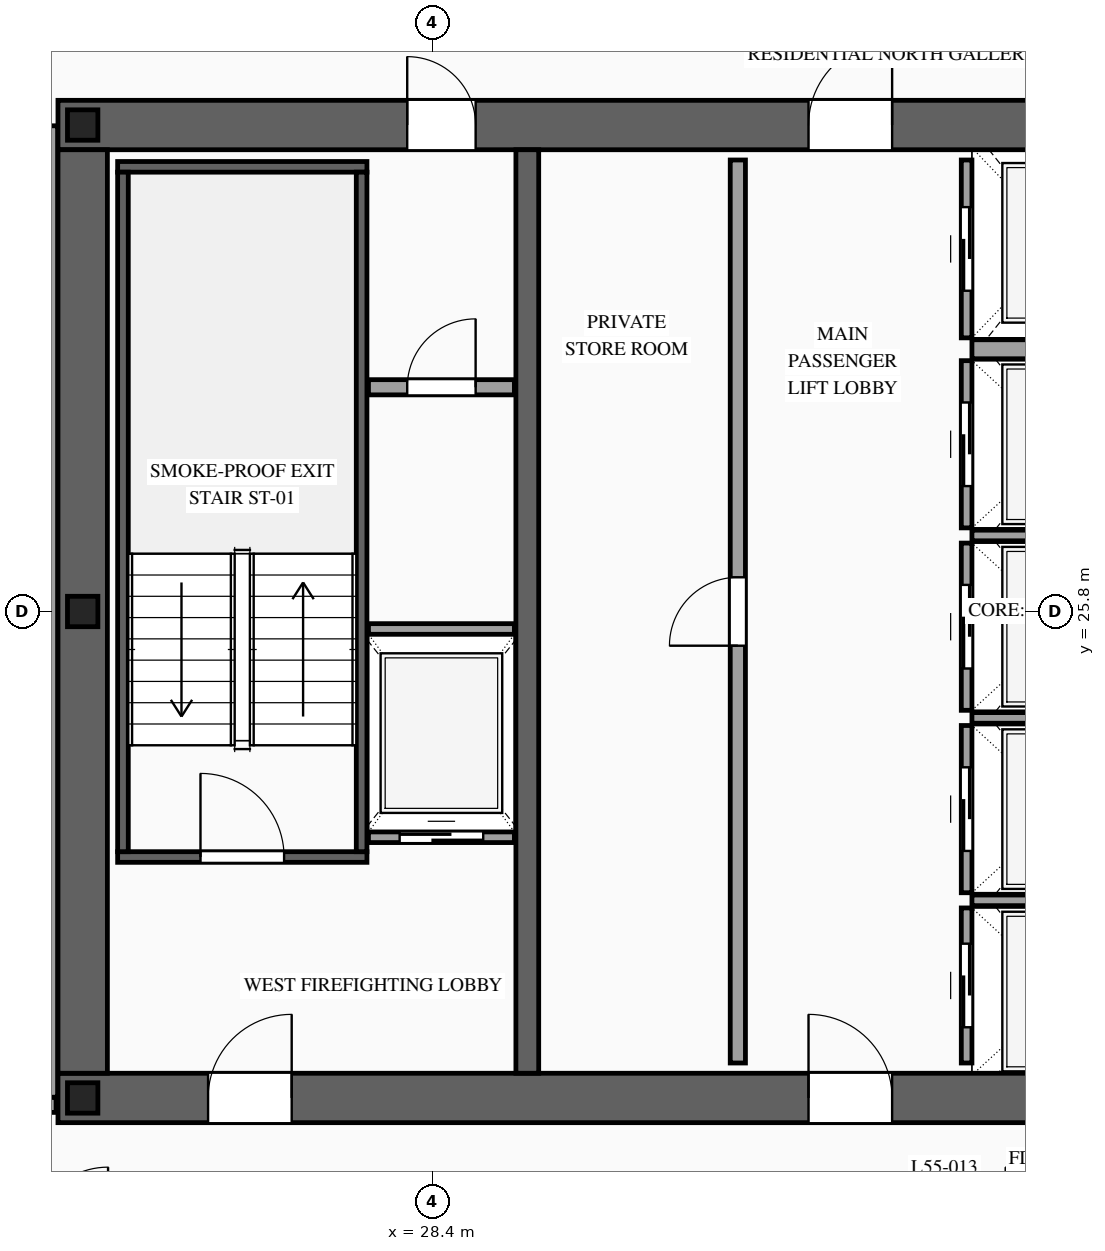
"""IFC4 building model, lengths in metres.
Left out: names, types, materials, properties, quantities, classifications, styles, units other than length and angle.
Written with IfcOpenShell. Run it as: python <this file> out.ifc"""

import sys

from ifc_helpers import new_model, si_unit, direction, frame, frame_2d, origin, origin_2d, place, context, subcontext, project, spatial, rectangle, i_section, extrude, source, transform, mapped, element, fill, save


model = new_model("IFC4")
c1 = context("Model", 3, precision=1e-05, world=origin(), true_north=direction((0.0, 1.0)))
c2 = subcontext(c1, "Body", "Model", "MODEL_VIEW")
j1 = project(units=[si_unit("LENGTHUNIT", "METRE"), si_unit("PLANEANGLEUNIT", "RADIAN")], contexts=[c1])
p1 = place(None, origin())
s1 = spatial("IfcSite", under=j1, at=p1, CompositionType="ELEMENT")
p2 = place(p1, origin())
s2 = spatial("IfcBuilding", under=s1, at=p2, CompositionType="ELEMENT")
p3 = place(p2, frame((0.0, 0.0, 209.0)))
s3 = spatial("IfcBuildingStorey", under=s2, at=p3, CompositionType="ELEMENT", Elevation=209.0)
p4 = place(p3, frame((23.475, 19.4, 0.0), z_axis=(0.0, 0.0, 1.0), x_axis=(1.0, 0.0, 0.0)))
e1 = element("IfcWall", 1, at=p4, inside=s3, PredefinedType="SHEAR", context=c2, shape_type="SweptSolid", body=[
    extrude(rectangle(XDim=27.05, YDim=0.65, at=frame_2d((13.525, 0.0))), origin(), (0.0, 0.0, 1.0), 3.5),
])
p5 = place(p4, frame((1.975, 0.0, 0.0)))
e2 = element("IfcOpeningElement", 2, at=p5, cuts=e1, PredefinedType="OPENING", context=c2, shape_type="SweptSolid", body=[
    extrude(rectangle(XDim=1.1, YDim=2.2, at=frame_2d((0.55, 1.1))), frame((0.0, 0.34, 0.0), z_axis=(0.0, -1.0, 0.0), x_axis=(1.0, 0.0, 0.0)), (0.0, 0.0, 1.0), 0.68),
])
p6 = place(p4, frame((9.875, 0.0, 0.0)))
e3 = element("IfcOpeningElement", 3, at=p6, cuts=e1, PredefinedType="OPENING", context=c2, shape_type="SweptSolid", body=[
    extrude(rectangle(XDim=1.1, YDim=2.2, at=frame_2d((0.55, 1.1))), frame((0.0, 0.34, 0.0), z_axis=(0.0, -1.0, 0.0), x_axis=(1.0, 0.0, 0.0)), (0.0, 0.0, 1.0), 0.68),
])
p7 = place(p4, frame((23.075, 0.0, 0.0)))
e4 = element("IfcOpeningElement", 4, at=p7, cuts=e1, PredefinedType="OPENING", context=c2, shape_type="SweptSolid", body=[
    extrude(rectangle(XDim=1.1, YDim=2.2, at=frame_2d((0.55, 1.1))), frame((0.0, 0.34, 0.0), z_axis=(0.0, -1.0, 0.0), x_axis=(1.0, 0.0, 0.0)), (0.0, 0.0, 1.0), 0.68),
])
p8 = place(p4, frame((19.695, 0.0, 0.0)))
e5 = element("IfcOpeningElement", 5, at=p8, cuts=e1, PredefinedType="OPENING", context=c2, shape_type="SweptSolid", body=[
    extrude(rectangle(XDim=0.9, YDim=2.15, at=frame_2d((0.45, 1.075))), frame((0.0, 0.34, 0.0), z_axis=(0.0, -1.0, 0.0), x_axis=(1.0, 0.0, 0.0)), (0.0, 0.0, 1.0), 0.68),
])
p9 = place(p4, frame((18.255, 0.0, 0.0)))
e6 = element("IfcOpeningElement", 6, at=p9, cuts=e1, PredefinedType="OPENING", context=c2, shape_type="SweptSolid", body=[
    extrude(rectangle(XDim=0.9, YDim=2.15, at=frame_2d((0.45, 1.075))), frame((0.0, 0.34, 0.0), z_axis=(0.0, -1.0, 0.0), x_axis=(1.0, 0.0, 0.0)), (0.0, 0.0, 1.0), 0.68),
])
p10 = place(p3, frame((23.475, 32.2, 0.0), z_axis=(0.0, 0.0, 1.0), x_axis=(1.0, 0.0, 0.0)))
e7 = element("IfcWall", 7, at=p10, inside=s3, PredefinedType="SHEAR", context=c2, shape_type="SweptSolid", body=[
    extrude(rectangle(XDim=27.05, YDim=0.65, at=frame_2d((13.525, 0.0))), origin(), (0.0, 0.0, 1.0), 3.5),
])
p11 = place(p10, frame((4.595, 0.0, 0.0)))
e8 = element("IfcOpeningElement", 8, at=p11, cuts=e7, PredefinedType="OPENING", context=c2, shape_type="SweptSolid", body=[
    extrude(rectangle(XDim=0.9, YDim=2.15, at=frame_2d((0.45, 1.075))), frame((0.0, 0.34, 0.0), z_axis=(0.0, -1.0, 0.0), x_axis=(1.0, 0.0, 0.0)), (0.0, 0.0, 1.0), 0.68),
])
p12 = place(p10, frame((9.875, 0.0, 0.0)))
e9 = element("IfcOpeningElement", 9, at=p12, cuts=e7, PredefinedType="OPENING", context=c2, shape_type="SweptSolid", body=[
    extrude(rectangle(XDim=1.1, YDim=2.2, at=frame_2d((0.55, 1.1))), frame((0.0, 0.34, 0.0), z_axis=(0.0, -1.0, 0.0), x_axis=(1.0, 0.0, 0.0)), (0.0, 0.0, 1.0), 0.68),
])
p13 = place(p10, frame((15.725, 0.0, 0.0)))
e10 = element("IfcOpeningElement", 10, at=p13, cuts=e7, PredefinedType="OPENING", context=c2, shape_type="SweptSolid", body=[
    extrude(rectangle(XDim=1.1, YDim=2.2, at=frame_2d((0.55, 1.1))), frame((0.0, 0.34, 0.0), z_axis=(0.0, -1.0, 0.0), x_axis=(1.0, 0.0, 0.0)), (0.0, 0.0, 1.0), 0.68),
])
m1 = source(origin(), c2, "Body", "SweptSolid", [
    extrude(rectangle(XDim=12.15, YDim=0.65, at=frame_2d((6.075, 0.0))), origin(), (0.0, 0.0, 1.0), 3.5),
])
p14 = place(p3, frame((23.8, 19.725, 0.0), z_axis=(0.0, 0.0, 1.0), x_axis=(0.0, 1.0, 0.0)))
e11 = element("IfcWall", 11, at=p14, inside=s3, PredefinedType="SHEAR", context=c2, shape_type="MappedRepresentation", body=[
    mapped(m1, transform((0.0, 0.0, 0.0), scale=1.0)),
])
m2 = source(origin(), c2, "Body", "SweptSolid", [
    extrude(rectangle(XDim=12.15, YDim=0.3, at=frame_2d((6.075, 0.0))), origin(), (0.0, 0.0, 1.0), 3.5),
])
p15 = place(p3, frame((29.65, 19.725, 0.0), z_axis=(0.0, 0.0, 1.0), x_axis=(0.0, 1.0, 0.0)))
e12 = element("IfcWall", 12, at=p15, inside=s3, PredefinedType="SOLIDWALL", context=c2, shape_type="MappedRepresentation", body=[
    mapped(m2, transform((0.0, 0.0, 0.0), scale=1.0)),
])
m3 = source(origin(), c2, "Body", "SweptSolid", [
    extrude(i_section(OverallWidth=0.4, OverallDepth=0.4, WebThickness=0.013, FlangeThickness=0.021, at=origin_2d()), origin(), (0.0, 0.0, 1.0), 3.5),
])
for number, where, z_axis, x_axis in (
    (13, (23.8, 19.4, 0.0), (0.0, 0.0, 1.0), (1.0, 0.0, 0.0)),
    (14, (23.8, 25.8, 0.0), (0.0, 0.0, 1.0), (1.0, 0.0, 0.0)),
    (15, (23.8, 32.2, 0.0), (0.0, 0.0, 1.0), (1.0, 0.0, 0.0)),
):
    element("IfcColumn", number, at=place(p3, frame(where, z_axis=z_axis, x_axis=x_axis)), inside=s3, PredefinedType="COLUMN", context=c2, shape_type="MappedRepresentation", body=[
        mapped(m3, transform((0.0, 0.0, 0.0), scale=1.0)),
    ])
p16 = place(p3, frame((27.56, 22.83, 0.0), z_axis=(0.0, 0.0, 1.0), x_axis=(1.0, 0.0, 0.0)))
e16 = element("IfcWall", 16, at=p16, inside=s3, PredefinedType="SOLIDWALL", context=c2, shape_type="SweptSolid", body=[
    extrude(rectangle(XDim=1.92, YDim=0.14, at=frame_2d((0.96, 0.0))), origin(), (0.0, 0.0, 1.0), 3.28),
])
p17 = place(p16, frame((0.41, 0.0, 0.0)))
e17 = element("IfcOpeningElement", 17, at=p17, cuts=e16, PredefinedType="OPENING", context=c2, shape_type="SweptSolid", body=[
    extrude(rectangle(XDim=1.1, YDim=2.2, at=frame_2d((0.55, 1.1))), frame((0.0, 0.085, 0.0), z_axis=(0.0, -1.0, 0.0), x_axis=(1.0, 0.0, 0.0)), (0.0, 0.0, 1.0), 0.17),
])
m4 = source(origin(), c2, "Body", "SweptSolid", [
    extrude(rectangle(XDim=1.92, YDim=0.14, at=frame_2d((0.96, 0.0))), origin(), (0.0, 0.0, 1.0), 3.28),
])
p18 = place(p3, frame((27.56, 25.57, 0.0), z_axis=(0.0, 0.0, 1.0), x_axis=(1.0, 0.0, 0.0)))
e18 = element("IfcWall", 18, at=p18, inside=s3, PredefinedType="SOLIDWALL", context=c2, shape_type="MappedRepresentation", body=[
    mapped(m4, transform((0.0, 0.0, 0.0), scale=1.0)),
])
p19 = place(p3, frame((35.43, 19.86, 0.0), z_axis=(0.0, 0.0, 1.0), x_axis=(0.0, 1.0, 0.0)))
e19 = element("IfcWall", 19, at=p19, inside=s3, PredefinedType="SOLIDWALL", context=c2, shape_type="SweptSolid", body=[
    extrude(rectangle(XDim=2.04, YDim=0.14, at=frame_2d((1.02, 0.0))), origin(), (0.0, 0.0, 1.0), 3.28),
])
p20 = place(p19, frame((0.47, 0.0, 0.0)))
e20 = element("IfcOpeningElement", 20, at=p20, cuts=e19, PredefinedType="OPENING", context=c2, shape_type="SweptSolid", body=[
    extrude(rectangle(XDim=1.1, YDim=2.2, at=frame_2d((0.55, 1.1))), frame((0.0, 0.085, 0.0), z_axis=(0.0, -1.0, 0.0), x_axis=(1.0, 0.0, 0.0)), (0.0, 0.0, 1.0), 0.17),
])
m5 = source(origin(), c2, "Body", "SweptSolid", [
    extrude(rectangle(XDim=2.4, YDim=0.14, at=frame_2d((1.2, 0.0))), origin(), (0.0, 0.0, 1.0), 3.28),
])
p21 = place(p3, frame((35.5, 22.0, 0.0), z_axis=(0.0, 0.0, 1.0), x_axis=(1.0, 0.0, 0.0)))
e21 = element("IfcWall", 21, at=p21, inside=s3, PredefinedType="SOLIDWALL", context=c2, shape_type="MappedRepresentation", body=[
    mapped(m5, transform((0.0, 0.0, 0.0), scale=1.0)),
])
p22 = place(p3, frame((35.43, 22.1, 0.0), z_axis=(0.0, 0.0, 1.0), x_axis=(0.0, 1.0, 0.0)))
e22 = element("IfcWall", 22, at=p22, inside=s3, PredefinedType="SOLIDWALL", context=c2, shape_type="SweptSolid", body=[
    extrude(rectangle(XDim=2.2, YDim=0.14, at=frame_2d((1.1, 0.0))), origin(), (0.0, 0.0, 1.0), 3.28),
])
p23 = place(p22, frame((0.55, 0.0, 0.0)))
e23 = element("IfcOpeningElement", 23, at=p23, cuts=e22, PredefinedType="OPENING", context=c2, shape_type="SweptSolid", body=[
    extrude(rectangle(XDim=1.1, YDim=2.2, at=frame_2d((0.55, 1.1))), frame((0.0, 0.085, 0.0), z_axis=(0.0, -1.0, 0.0), x_axis=(1.0, 0.0, 0.0)), (0.0, 0.0, 1.0), 0.17),
])
p24 = place(p3, frame((35.5, 24.4, 0.0), z_axis=(0.0, 0.0, 1.0), x_axis=(1.0, 0.0, 0.0)))
e24 = element("IfcWall", 24, at=p24, inside=s3, PredefinedType="SOLIDWALL", context=c2, shape_type="MappedRepresentation", body=[
    mapped(m5, transform((0.0, 0.0, 0.0), scale=1.0)),
])
p25 = place(p3, frame((35.43, 24.5, 0.0), z_axis=(0.0, 0.0, 1.0), x_axis=(0.0, 1.0, 0.0)))
e25 = element("IfcWall", 25, at=p25, inside=s3, PredefinedType="SOLIDWALL", context=c2, shape_type="SweptSolid", body=[
    extrude(rectangle(XDim=2.2, YDim=0.14, at=frame_2d((1.1, 0.0))), origin(), (0.0, 0.0, 1.0), 3.28),
])
p26 = place(p25, frame((0.55, 0.0, 0.0)))
e26 = element("IfcOpeningElement", 26, at=p26, cuts=e25, PredefinedType="OPENING", context=c2, shape_type="SweptSolid", body=[
    extrude(rectangle(XDim=1.1, YDim=2.2, at=frame_2d((0.55, 1.1))), frame((0.0, 0.085, 0.0), z_axis=(0.0, -1.0, 0.0), x_axis=(1.0, 0.0, 0.0)), (0.0, 0.0, 1.0), 0.17),
])
p27 = place(p3, frame((35.5, 26.8, 0.0), z_axis=(0.0, 0.0, 1.0), x_axis=(1.0, 0.0, 0.0)))
e27 = element("IfcWall", 27, at=p27, inside=s3, PredefinedType="SOLIDWALL", context=c2, shape_type="MappedRepresentation", body=[
    mapped(m5, transform((0.0, 0.0, 0.0), scale=1.0)),
])
p28 = place(p3, frame((35.43, 26.9, 0.0), z_axis=(0.0, 0.0, 1.0), x_axis=(0.0, 1.0, 0.0)))
e28 = element("IfcWall", 28, at=p28, inside=s3, PredefinedType="SOLIDWALL", context=c2, shape_type="SweptSolid", body=[
    extrude(rectangle(XDim=2.2, YDim=0.14, at=frame_2d((1.1, 0.0))), origin(), (0.0, 0.0, 1.0), 3.28),
])
p29 = place(p28, frame((0.55, 0.0, 0.0)))
e29 = element("IfcOpeningElement", 29, at=p29, cuts=e28, PredefinedType="OPENING", context=c2, shape_type="SweptSolid", body=[
    extrude(rectangle(XDim=1.1, YDim=2.2, at=frame_2d((0.55, 1.1))), frame((0.0, 0.085, 0.0), z_axis=(0.0, -1.0, 0.0), x_axis=(1.0, 0.0, 0.0)), (0.0, 0.0, 1.0), 0.17),
])
p30 = place(p3, frame((35.43, 29.4, 0.0), z_axis=(0.0, 0.0, 1.0), x_axis=(0.0, 1.0, 0.0)))
e30 = element("IfcWall", 30, at=p30, inside=s3, PredefinedType="SOLIDWALL", context=c2, shape_type="SweptSolid", body=[
    extrude(rectangle(XDim=2.34, YDim=0.14, at=frame_2d((1.17, 0.0))), origin(), (0.0, 0.0, 1.0), 3.28),
])
p31 = place(p30, frame((0.62, 0.0, 0.0)))
e31 = element("IfcOpeningElement", 31, at=p31, cuts=e30, PredefinedType="OPENING", context=c2, shape_type="SweptSolid", body=[
    extrude(rectangle(XDim=1.1, YDim=2.2, at=frame_2d((0.55, 1.1))), frame((0.0, 0.085, 0.0), z_axis=(0.0, -1.0, 0.0), x_axis=(1.0, 0.0, 0.0)), (0.0, 0.0, 1.0), 0.17),
])
m6 = source(origin(), c2, "Body", "SweptSolid", [
    extrude(rectangle(XDim=2.4, YDim=0.25, at=frame_2d((1.2, 0.0))), origin(), (0.0, 0.0, 1.0), 3.28),
])
p32 = place(p3, frame((35.5, 29.25, 0.0), z_axis=(0.0, 0.0, 1.0), x_axis=(1.0, 0.0, 0.0)))
e32 = element("IfcWall", 32, at=p32, inside=s3, PredefinedType="SOLIDWALL", context=c2, shape_type="MappedRepresentation", body=[
    mapped(m6, transform((0.0, 0.0, 0.0), scale=1.0)),
])
p33 = place(p3, frame((24.26, 22.57, 0.0), z_axis=(0.0, 0.0, 1.0), x_axis=(1.0, 0.0, 0.0)))
e33 = element("IfcWall", 33, at=p33, inside=s3, PredefinedType="SOLIDWALL", context=c2, shape_type="SweptSolid", body=[
    extrude(rectangle(XDim=3.28, YDim=0.14, at=frame_2d((1.64, 0.0))), origin(), (0.0, 0.0, 1.0), 3.28),
])
p34 = place(p33, frame((1.09, 0.0, 0.0)))
e34 = element("IfcOpeningElement", 34, at=p34, cuts=e33, PredefinedType="OPENING", context=c2, shape_type="SweptSolid", body=[
    extrude(rectangle(XDim=1.1, YDim=2.2, at=frame_2d((0.55, 1.1))), frame((0.0, 0.085, 0.0), z_axis=(0.0, -1.0, 0.0), x_axis=(1.0, 0.0, 0.0)), (0.0, 0.0, 1.0), 0.17),
])
m7 = source(origin(), c2, "Body", "SweptSolid", [
    extrude(rectangle(XDim=3.28, YDim=0.14, at=frame_2d((1.64, 0.0))), origin(), (0.0, 0.0, 1.0), 3.28),
])
p35 = place(p3, frame((24.26, 31.65, 0.0), z_axis=(0.0, 0.0, 1.0), x_axis=(1.0, 0.0, 0.0)))
e35 = element("IfcWall", 35, at=p35, inside=s3, PredefinedType="SOLIDWALL", context=c2, shape_type="MappedRepresentation", body=[
    mapped(m7, transform((0.0, 0.0, 0.0), scale=1.0)),
])
m8 = source(origin(), c2, "Body", "SweptSolid", [
    extrude(rectangle(XDim=8.94, YDim=0.14, at=frame_2d((4.47, 0.0))), origin(), (0.0, 0.0, 1.0), 3.28),
])
for number, where, z_axis, x_axis in (
    (36, (24.33, 22.64, 0.0), (0.0, 0.0, 1.0), (0.0, 1.0, 0.0)),
    (37, (27.47, 22.64, 0.0), (0.0, 0.0, 1.0), (0.0, 1.0, 0.0)),
):
    element("IfcWall", number, at=place(p3, frame(where, z_axis=z_axis, x_axis=x_axis)), inside=s3, PredefinedType="SOLIDWALL", context=c2, shape_type="MappedRepresentation", body=[
        mapped(m8, transform((0.0, 0.0, 0.0), scale=1.0)),
    ])
p36 = place(p3, frame((27.56, 28.75, 0.0), z_axis=(0.0, 0.0, 1.0), x_axis=(1.0, 0.0, 0.0)))
e38 = element("IfcWall", 38, at=p36, inside=s3, PredefinedType="PARTITIONING", context=c2, shape_type="SweptSolid", body=[
    extrude(rectangle(XDim=1.92, YDim=0.2, at=frame_2d((0.96, 0.0))), origin(), (0.0, 0.0, 1.0), 3.28),
])
p37 = place(p36, frame((0.51, 0.0, 0.0)))
e39 = element("IfcOpeningElement", 39, at=p37, cuts=e38, PredefinedType="OPENING", context=c2, shape_type="SweptSolid", body=[
    extrude(rectangle(XDim=0.9, YDim=2.15, at=frame_2d((0.45, 1.075))), frame((0.0, 0.115, 0.0), z_axis=(0.0, -1.0, 0.0), x_axis=(1.0, 0.0, 0.0)), (0.0, 0.0, 1.0), 0.23),
])
p38 = place(p3, frame((32.42, 19.86, 0.0), z_axis=(0.0, 0.0, 1.0), x_axis=(0.0, 1.0, 0.0)))
e40 = element("IfcWall", 40, at=p38, inside=s3, PredefinedType="PARTITIONING", context=c2, shape_type="SweptSolid", body=[
    extrude(rectangle(XDim=11.88, YDim=0.2, at=frame_2d((5.94, 0.0))), origin(), (0.0, 0.0, 1.0), 3.28),
])
p39 = place(p38, frame((5.49, 0.0, 0.0)))
e41 = element("IfcOpeningElement", 41, at=p39, cuts=e40, PredefinedType="OPENING", context=c2, shape_type="SweptSolid", body=[
    extrude(rectangle(XDim=0.9, YDim=2.15, at=frame_2d((0.45, 1.075))), frame((0.0, 0.115, 0.0), z_axis=(0.0, -1.0, 0.0), x_axis=(1.0, 0.0, 0.0)), (0.0, 0.0, 1.0), 0.23),
])
m9 = source(origin(), c2, "Body", "SweptSolid", [
    extrude(rectangle(XDim=8.4, YDim=0.2, at=frame_2d((4.2, 0.0))), origin(), (0.0, 0.0, 1.0), 2.775),
])
p40 = place(p3, frame((15.05, 19.31, 0.0), z_axis=(0.0, 0.0, 1.0), x_axis=(1.0, 0.0, 0.0)))
e42 = element("IfcWall", 42, at=p40, inside=s3, PredefinedType="PARTITIONING", context=c2, shape_type="MappedRepresentation", body=[
    mapped(m9, transform((0.0, 0.0, 0.0), scale=1.0)),
])
m10 = source(origin(), c2, "Body", "SweptSolid", [
    extrude(rectangle(XDim=12.78, YDim=0.2, at=frame_2d((6.39, 0.0))), origin(), (0.0, 0.0, 1.0), 3.28),
])
p41 = place(p3, frame((23.37, 19.41, 0.0), z_axis=(0.0, 0.0, 1.0), x_axis=(0.0, 1.0, 0.0)))
e43 = element("IfcWall", 43, at=p41, inside=s3, PredefinedType="PARTITIONING", context=c2, shape_type="MappedRepresentation", body=[
    mapped(m10, transform((0.0, 0.0, 0.0), scale=1.0)),
])
m11 = source(origin(), c2, "Body", "SweptSolid", [
    extrude(rectangle(XDim=1.1, YDim=2.2, at=frame_2d((0.55, 1.1))), frame((0.0, 0.025, 0.0), z_axis=(0.0, -1.0, 0.0), x_axis=(1.0, 0.0, 0.0)), (0.0, 0.0, 1.0), 0.05),
])
p42 = place(p17, origin())
e44 = element("IfcDoor", 44, at=p42, inside=s3, OperationType="SLIDING_TO_LEFT", PredefinedType="DOOR", context=c2, shape_type="MappedRepresentation", body=[
    mapped(m11, transform((0.0, 0.0, 0.0), scale=1.0)),
])
fill(e17, e44)
p43 = place(p20, origin())
e45 = element("IfcDoor", 45, at=p43, inside=s3, OperationType="SLIDING_TO_RIGHT", PredefinedType="DOOR", context=c2, shape_type="MappedRepresentation", body=[
    mapped(m11, transform((0.0, 0.0, 0.0), scale=1.0)),
])
fill(e20, e45)
p44 = place(p23, origin())
e46 = element("IfcDoor", 46, at=p44, inside=s3, OperationType="SLIDING_TO_LEFT", PredefinedType="DOOR", context=c2, shape_type="MappedRepresentation", body=[
    mapped(m11, transform((0.0, 0.0, 0.0), scale=1.0)),
])
fill(e23, e46)
p45 = place(p26, origin())
e47 = element("IfcDoor", 47, at=p45, inside=s3, OperationType="SLIDING_TO_RIGHT", PredefinedType="DOOR", context=c2, shape_type="MappedRepresentation", body=[
    mapped(m11, transform((0.0, 0.0, 0.0), scale=1.0)),
])
fill(e26, e47)
p46 = place(p29, origin())
e48 = element("IfcDoor", 48, at=p46, inside=s3, OperationType="SLIDING_TO_LEFT", PredefinedType="DOOR", context=c2, shape_type="MappedRepresentation", body=[
    mapped(m11, transform((0.0, 0.0, 0.0), scale=1.0)),
])
fill(e29, e48)
p47 = place(p31, origin())
e49 = element("IfcDoor", 49, at=p47, inside=s3, OperationType="SLIDING_TO_RIGHT", PredefinedType="DOOR", context=c2, shape_type="MappedRepresentation", body=[
    mapped(m11, transform((0.0, 0.0, 0.0), scale=1.0)),
])
fill(e31, e49)
m12 = source(origin(), c2, "Body", "SweptSolid", [
    extrude(rectangle(XDim=1.1, YDim=2.2, at=frame_2d((0.55, 1.1))), frame((0.0, 0.025, 0.0), z_axis=(0.0, -1.0, 0.0), x_axis=(1.0, 0.0, 0.0)), (0.0, 0.0, 1.0), 0.05),
])
p48 = place(p34, origin())
e50 = element("IfcDoor", 50, at=p48, inside=s3, OperationType="SINGLE_SWING_LEFT", PredefinedType="DOOR", context=c2, shape_type="MappedRepresentation", body=[
    mapped(m12, transform((0.0, 0.0, 0.0), scale=1.0)),
])
fill(e34, e50)
p49 = place(p5, origin())
e51 = element("IfcDoor", 51, at=p49, inside=s3, OperationType="SINGLE_SWING_RIGHT", PredefinedType="DOOR", context=c2, shape_type="MappedRepresentation", body=[
    mapped(m12, transform((0.0, 0.0, 0.0), scale=1.0)),
])
fill(e2, e51)
p50 = place(p6, origin())
e52 = element("IfcDoor", 52, at=p50, inside=s3, OperationType="SINGLE_SWING_LEFT", PredefinedType="DOOR", context=c2, shape_type="MappedRepresentation", body=[
    mapped(m12, transform((0.0, 0.0, 0.0), scale=1.0)),
])
fill(e3, e52)
m13 = source(origin(), c2, "Body", "SweptSolid", [
    extrude(rectangle(XDim=0.9, YDim=2.15, at=frame_2d((0.45, 1.075))), frame((0.0, 0.025, 0.0), z_axis=(0.0, -1.0, 0.0), x_axis=(1.0, 0.0, 0.0)), (0.0, 0.0, 1.0), 0.05),
])
p51 = place(p11, origin())
e53 = element("IfcDoor", 53, at=p51, inside=s3, OperationType="SINGLE_SWING_LEFT", PredefinedType="DOOR", context=c2, shape_type="MappedRepresentation", body=[
    mapped(m13, transform((0.0, 0.0, 0.0), scale=1.0)),
])
fill(e8, e53)
p52 = place(p12, origin())
e54 = element("IfcDoor", 54, at=p52, inside=s3, OperationType="SINGLE_SWING_RIGHT", PredefinedType="DOOR", context=c2, shape_type="MappedRepresentation", body=[
    mapped(m12, transform((0.0, 0.0, 0.0), scale=1.0)),
])
fill(e9, e54)
p53 = place(p37, origin())
e55 = element("IfcDoor", 55, at=p53, inside=s3, OperationType="SINGLE_SWING_RIGHT", PredefinedType="DOOR", context=c2, shape_type="MappedRepresentation", body=[
    mapped(m13, transform((0.0, 0.0, 0.0), scale=1.0)),
])
fill(e39, e55)
p54 = place(p39, origin())
e56 = element("IfcDoor", 56, at=p54, inside=s3, OperationType="SINGLE_SWING_LEFT", PredefinedType="DOOR", context=c2, shape_type="MappedRepresentation", body=[
    mapped(m13, transform((0.0, 0.0, 0.0), scale=1.0)),
])
fill(e41, e56)
save(model, sys.argv[1])
